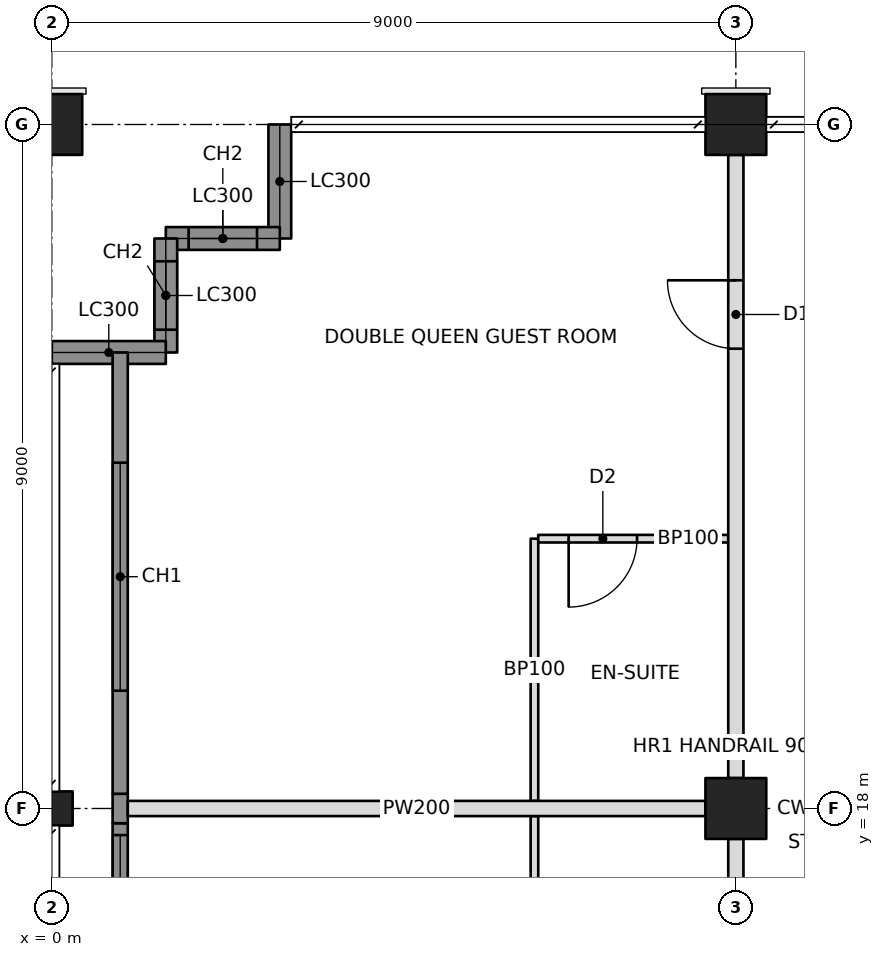
"""IFC4 building model, lengths in metres.
Left out: names, types, materials, properties, quantities, classifications, styles, units other than length and angle.
Written with IfcOpenShell. Run it as: python <this file> out.ifc"""

import sys

from ifc_helpers import new_model, si_unit, direction, frame, frame_2d, origin, origin_2d, place, context, subcontext, project, spatial, rectangle, hollow_rectangle, i_section, extrude, element, fill, save


model = new_model("IFC4")
c1 = context("Model", 3, precision=1e-05, world=origin(), true_north=direction((0.0, 1.0)))
c2 = subcontext(c1, "Body", "Model", "MODEL_VIEW")
j1 = project(units=[si_unit("LENGTHUNIT", "METRE"), si_unit("PLANEANGLEUNIT", "RADIAN")], contexts=[c1])
p1 = place(None, origin())
s1 = spatial("IfcSite", under=j1, at=p1, CompositionType="ELEMENT")
p2 = place(p1, origin())
s2 = spatial("IfcBuilding", under=s1, at=p2, CompositionType="ELEMENT")
p3 = place(p2, frame((0.0, 0.0, 187.6)))
s3 = spatial("IfcBuildingStorey", under=s2, at=p3, CompositionType="ELEMENT", Elevation=187.6)
p4 = place(p3, frame((0.0, 18.0, 0.0), z_axis=(0.0, 0.0, 1.0), x_axis=(0.0, 1.0, 0.0)))
e1 = element("IfcColumn", 1, at=p4, inside=s3, PredefinedType="COLUMN", context=c2, shape_type="SweptSolid", body=[
    extrude(i_section(OverallWidth=0.449, OverallDepth=0.549, WebThickness=0.072, FlangeThickness=0.115, at=origin_2d()), origin(), (0.0, 0.0, 1.0), 3.4),
])
p5 = place(p3, frame((0.0, 27.0, 0.0), z_axis=(0.0, 0.0, 1.0), x_axis=(0.0, 1.0, 0.0)))
e2 = element("IfcColumn", 2, at=p5, inside=s3, PredefinedType="COLUMN", context=c2, shape_type="SweptSolid", body=[
    extrude(hollow_rectangle(XDim=0.8, YDim=0.8, WallThickness=0.07, at=origin_2d()), origin(), (0.0, 0.0, 1.0), 3.4),
])
p6 = place(p3, frame((9.0, 18.0, 0.0), z_axis=(0.0, 0.0, 1.0), x_axis=(1.0, 0.0, 0.0)))
e3 = element("IfcColumn", 3, at=p6, inside=s3, PredefinedType="COLUMN", context=c2, shape_type="SweptSolid", body=[
    extrude(hollow_rectangle(XDim=0.8, YDim=0.8, WallThickness=0.06, at=origin_2d()), origin(), (0.0, 0.0, 1.0), 3.4),
])
p7 = place(p3, frame((9.0, 27.0, 0.0), z_axis=(0.0, 0.0, 1.0), x_axis=(1.0, 0.0, 0.0)))
e4 = element("IfcColumn", 4, at=p7, inside=s3, PredefinedType="COLUMN", context=c2, shape_type="SweptSolid", body=[
    extrude(hollow_rectangle(XDim=0.8, YDim=0.8, WallThickness=0.07, at=origin_2d()), origin(), (0.0, 0.0, 1.0), 3.4),
])
p8 = place(p3, frame((3.0, 27.0, 0.0), z_axis=(0.0, 0.0, 1.0), x_axis=(0.0, -1.0, 0.0)))
e5 = element("IfcWall", 5, at=p8, inside=s3, PredefinedType="SOLIDWALL", context=c2, shape_type="SweptSolid", body=[
    extrude(rectangle(XDim=1.5, YDim=0.3, at=frame_2d((0.75, 0.0))), origin(), (0.0, 0.0, 1.0), 2.42),
])
p9 = place(p3, frame((3.0, 25.5, 0.0), z_axis=(0.0, 0.0, 1.0), x_axis=(-1.0, 0.0, 0.0)))
e6 = element("IfcWall", 6, at=p9, inside=s3, PredefinedType="SOLIDWALL", context=c2, shape_type="SweptSolid", body=[
    extrude(rectangle(XDim=1.5, YDim=0.3, at=frame_2d((0.75, 0.0))), origin(), (0.0, 0.0, 1.0), 3.2),
])
p10 = place(p9, frame((0.3, 0.0, 0.6)))
e7 = element("IfcOpeningElement", 7, at=p10, cuts=e6, PredefinedType="OPENING", context=c2, shape_type="SweptSolid", body=[
    extrude(rectangle(XDim=0.9, YDim=2.2, at=frame_2d((0.45, 1.1))), frame((0.0, 0.16, 0.0), z_axis=(0.0, -1.0, 0.0), x_axis=(1.0, 0.0, 0.0)), (0.0, 0.0, 1.0), 0.32),
])
p11 = place(p3, frame((1.5, 25.5, 0.0), z_axis=(0.0, 0.0, 1.0), x_axis=(0.0, -1.0, 0.0)))
e8 = element("IfcWall", 8, at=p11, inside=s3, PredefinedType="SOLIDWALL", context=c2, shape_type="SweptSolid", body=[
    extrude(rectangle(XDim=1.5, YDim=0.3, at=frame_2d((0.75, 0.0))), origin(), (0.0, 0.0, 1.0), 3.2),
])
p12 = place(p11, frame((0.3, 0.0, 0.6)))
e9 = element("IfcOpeningElement", 9, at=p12, cuts=e8, PredefinedType="OPENING", context=c2, shape_type="SweptSolid", body=[
    extrude(rectangle(XDim=0.9, YDim=2.2, at=frame_2d((0.45, 1.1))), frame((0.0, 0.16, 0.0), z_axis=(0.0, -1.0, 0.0), x_axis=(1.0, 0.0, 0.0)), (0.0, 0.0, 1.0), 0.32),
])
p13 = place(p3, frame((1.5, 24.0, 0.0), z_axis=(0.0, 0.0, 1.0), x_axis=(-1.0, 0.0, 0.0)))
e10 = element("IfcWall", 10, at=p13, inside=s3, PredefinedType="SOLIDWALL", context=c2, shape_type="SweptSolid", body=[
    extrude(rectangle(XDim=1.5, YDim=0.3, at=frame_2d((0.75, 0.0))), origin(), (0.0, 0.0, 1.0), 2.42),
])
p14 = place(p3, frame((9.0, 10.8, 0.0), z_axis=(0.0, 0.0, 1.0), x_axis=(0.0, 1.0, 0.0)))
e11 = element("IfcWall", 11, at=p14, inside=s3, PredefinedType="PARTITIONING", context=c2, shape_type="SweptSolid", body=[
    extrude(rectangle(XDim=6.8, YDim=0.2, at=frame_2d((3.4, 0.0))), origin(), (0.0, 0.0, 1.0), 2.405),
])
p15 = place(p14, frame((0.25, 0.0, 0.0)))
e12 = element("IfcOpeningElement", 12, at=p15, cuts=e11, PredefinedType="OPENING", context=c2, shape_type="SweptSolid", body=[
    extrude(rectangle(XDim=0.9, YDim=2.1, at=frame_2d((0.45, 1.05))), frame((0.0, 0.11, 0.0), z_axis=(0.0, -1.0, 0.0), x_axis=(1.0, 0.0, 0.0)), (0.0, 0.0, 1.0), 0.22),
])
p16 = place(p3, frame((9.0, 18.4, 0.0), z_axis=(0.0, 0.0, 1.0), x_axis=(0.0, 1.0, 0.0)))
e13 = element("IfcWall", 13, at=p16, inside=s3, PredefinedType="PARTITIONING", context=c2, shape_type="SweptSolid", body=[
    extrude(rectangle(XDim=8.2, YDim=0.2, at=frame_2d((4.1, 0.0))), origin(), (0.0, 0.0, 1.0), 2.405),
])
p17 = place(p16, frame((5.65, 0.0, 0.0)))
e14 = element("IfcOpeningElement", 14, at=p17, cuts=e13, PredefinedType="OPENING", context=c2, shape_type="SweptSolid", body=[
    extrude(rectangle(XDim=0.9, YDim=2.1, at=frame_2d((0.45, 1.05))), frame((0.0, 0.11, 0.0), z_axis=(0.0, -1.0, 0.0), x_axis=(1.0, 0.0, 0.0)), (0.0, 0.0, 1.0), 0.22),
])
p18 = place(p3, frame((8.6, 18.0, 0.0), z_axis=(0.0, 0.0, 1.0), x_axis=(-1.0, 0.0, 0.0)))
e15 = element("IfcWall", 15, at=p18, inside=s3, PredefinedType="PARTITIONING", context=c2, shape_type="SweptSolid", body=[
    extrude(rectangle(XDim=7.6, YDim=0.2, at=frame_2d((3.8, 0.0))), origin(), (0.0, 0.0, 1.0), 2.405),
])
for number, where, z_axis, x_axis in (
    (16, (6.35, 14.45, 0.0), (0.0, 0.0, 1.0), (0.0, 1.0, 0.0)),
    (17, (6.35, 18.1, 0.0), (0.0, 0.0, 1.0), (0.0, 1.0, 0.0)),
):
    element("IfcWall", number, at=place(p3, frame(where, z_axis=z_axis, x_axis=x_axis)), inside=s3, PredefinedType="PARTITIONING", context=c2, shape_type="SweptSolid", body=[
        extrude(rectangle(XDim=3.45, YDim=0.1, at=frame_2d((1.725, 0.0))), origin(), (0.0, 0.0, 1.0), 2.404),
    ])
p19 = place(p3, frame((8.9, 21.55, 0.0), z_axis=(0.0, 0.0, 1.0), x_axis=(-1.0, 0.0, 0.0)))
e18 = element("IfcWall", 18, at=p19, inside=s3, PredefinedType="PARTITIONING", context=c2, shape_type="SweptSolid", body=[
    extrude(rectangle(XDim=2.5, YDim=0.1, at=frame_2d((1.25, 0.0))), origin(), (0.0, 0.0, 1.0), 2.404),
])
p20 = place(p19, frame((1.2, 0.0, 0.0)))
e19 = element("IfcOpeningElement", 19, at=p20, cuts=e18, PredefinedType="OPENING", context=c2, shape_type="SweptSolid", body=[
    extrude(rectangle(XDim=0.9, YDim=2.1, at=frame_2d((0.45, 1.05))), frame((0.0, 0.06, 0.0), z_axis=(0.0, -1.0, 0.0), x_axis=(1.0, 0.0, 0.0)), (0.0, 0.0, 1.0), 0.12),
])
p21 = place(p3, frame((0.9, 9.135, 0.0), z_axis=(0.0, 0.0, 1.0), x_axis=(0.0, 1.0, 0.0)))
e20 = element("IfcWall", 20, at=p21, inside=s3, PredefinedType="SOLIDWALL", context=c2, shape_type="SweptSolid", body=[
    extrude(rectangle(XDim=8.671, YDim=0.2, at=frame_2d((4.335, 0.0))), origin(), (0.0, 0.0, 1.0), 3.2),
])
p22 = place(p21, frame((2.015, 0.0, 0.6)))
e21 = element("IfcOpeningElement", 21, at=p22, cuts=e20, PredefinedType="OPENING", context=c2, shape_type="SweptSolid", body=[
    extrude(rectangle(XDim=3.0, YDim=2.2, at=frame_2d((1.5, 1.1))), frame((0.0, 0.11, 0.0), z_axis=(0.0, -1.0, 0.0), x_axis=(1.0, 0.0, 0.0)), (0.0, 0.0, 1.0), 0.22),
])
p23 = place(p21, frame((5.515, 0.0, 0.6)))
e22 = element("IfcOpeningElement", 22, at=p23, cuts=e20, PredefinedType="OPENING", context=c2, shape_type="SweptSolid", body=[
    extrude(rectangle(XDim=3.0, YDim=2.2, at=frame_2d((1.5, 1.1))), frame((0.0, 0.11, 0.0), z_axis=(0.0, -1.0, 0.0), x_axis=(1.0, 0.0, 0.0)), (0.0, 0.0, 1.0), 0.22),
])
p24 = place(p3, frame((0.9, 17.806, 0.0), z_axis=(0.0, 0.0, 1.0), x_axis=(0.0, 1.0, 0.0)))
e23 = element("IfcWall", 23, at=p24, inside=s3, PredefinedType="SOLIDWALL", context=c2, shape_type="SweptSolid", body=[
    extrude(rectangle(XDim=0.388, YDim=0.2, at=frame_2d((0.194, 0.0))), origin(), (0.0, 0.0, 1.0), 2.404),
])
p25 = place(p3, frame((0.9, 18.194, 0.0), z_axis=(0.0, 0.0, 1.0), x_axis=(0.0, 1.0, 0.0)))
e24 = element("IfcWall", 24, at=p25, inside=s3, PredefinedType="SOLIDWALL", context=c2, shape_type="SweptSolid", body=[
    extrude(rectangle(XDim=5.806, YDim=0.2, at=frame_2d((2.903, 0.0))), origin(), (0.0, 0.0, 1.0), 3.2),
])
p26 = place(p25, frame((1.356, 0.0, 0.6)))
e25 = element("IfcOpeningElement", 25, at=p26, cuts=e24, PredefinedType="OPENING", context=c2, shape_type="SweptSolid", body=[
    extrude(rectangle(XDim=3.0, YDim=2.2, at=frame_2d((1.5, 1.1))), frame((0.0, 0.11, 0.0), z_axis=(0.0, -1.0, 0.0), x_axis=(1.0, 0.0, 0.0)), (0.0, 0.0, 1.0), 0.22),
])
p27 = place(p10, origin())
e26 = element("IfcWindow", 26, at=p27, inside=s3, PartitioningType="SINGLE_PANEL", PredefinedType="WINDOW", context=c2, shape_type="SweptSolid", body=[
    extrude(rectangle(XDim=0.9, YDim=2.2, at=frame_2d((0.45, 1.1))), frame((0.0, 0.03, 0.0), z_axis=(0.0, -1.0, 0.0), x_axis=(1.0, 0.0, 0.0)), (0.0, 0.0, 1.0), 0.06),
])
fill(e7, e26)
p28 = place(p12, origin())
e27 = element("IfcWindow", 27, at=p28, inside=s3, PartitioningType="SINGLE_PANEL", PredefinedType="WINDOW", context=c2, shape_type="SweptSolid", body=[
    extrude(rectangle(XDim=0.9, YDim=2.2, at=frame_2d((0.45, 1.1))), frame((0.0, 0.03, 0.0), z_axis=(0.0, -1.0, 0.0), x_axis=(1.0, 0.0, 0.0)), (0.0, 0.0, 1.0), 0.06),
])
fill(e9, e27)
p29 = place(p23, origin())
e28 = element("IfcWindow", 28, at=p29, inside=s3, PartitioningType="TRIPLE_PANEL_VERTICAL", PredefinedType="WINDOW", context=c2, shape_type="SweptSolid", body=[
    extrude(rectangle(XDim=3.0, YDim=2.2, at=frame_2d((1.5, 1.1))), frame((0.0, 0.03, 0.0), z_axis=(0.0, -1.0, 0.0), x_axis=(1.0, 0.0, 0.0)), (0.0, 0.0, 1.0), 0.06),
])
fill(e22, e28)
p30 = place(p26, origin())
e29 = element("IfcWindow", 29, at=p30, inside=s3, PartitioningType="TRIPLE_PANEL_VERTICAL", PredefinedType="WINDOW", context=c2, shape_type="SweptSolid", body=[
    extrude(rectangle(XDim=3.0, YDim=2.2, at=frame_2d((1.5, 1.1))), frame((0.0, 0.03, 0.0), z_axis=(0.0, -1.0, 0.0), x_axis=(1.0, 0.0, 0.0)), (0.0, 0.0, 1.0), 0.06),
])
fill(e25, e29)
p31 = place(p20, origin())
e30 = element("IfcDoor", 30, at=p31, inside=s3, OperationType="SINGLE_SWING_RIGHT", PredefinedType="DOOR", context=c2, shape_type="SweptSolid", body=[
    extrude(rectangle(XDim=0.9, YDim=2.1, at=frame_2d((0.45, 1.05))), frame((0.0, 0.025, 0.0), z_axis=(0.0, -1.0, 0.0), x_axis=(1.0, 0.0, 0.0)), (0.0, 0.0, 1.0), 0.05),
])
fill(e19, e30)
p32 = place(p17, origin())
e31 = element("IfcDoor", 31, at=p32, inside=s3, OperationType="SINGLE_SWING_RIGHT", PredefinedType="DOOR", context=c2, shape_type="SweptSolid", body=[
    extrude(rectangle(XDim=0.9, YDim=2.1, at=frame_2d((0.45, 1.05))), frame((0.0, 0.025, 0.0), z_axis=(0.0, -1.0, 0.0), x_axis=(1.0, 0.0, 0.0)), (0.0, 0.0, 1.0), 0.05),
])
fill(e14, e31)
save(model, sys.argv[1])
